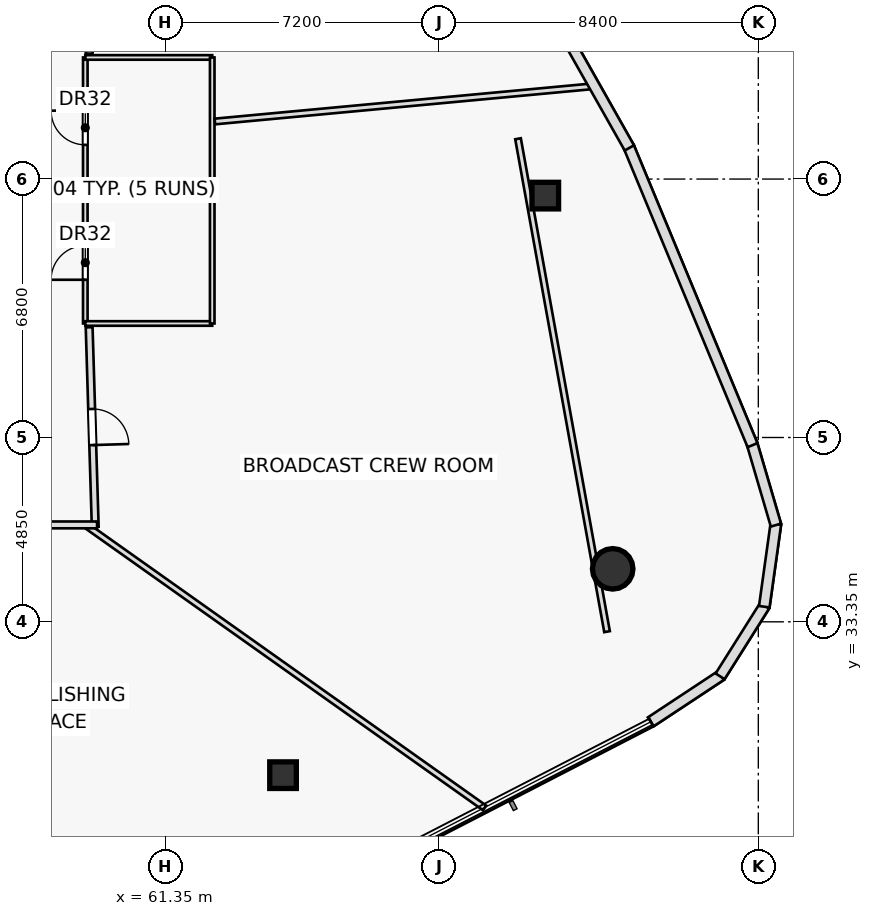
"""IFC4 building model, lengths in metres.
Left out: names, types, materials, properties, quantities, classifications, styles, units other than length and angle.
Written with IfcOpenShell. Run it as: python <this file> out.ifc"""

import sys

from ifc_helpers import new_model, si_unit, direction, frame, frame_2d, origin, origin_2d, place, context, subcontext, project, spatial, rectangle, hollow_rectangle, hollow_circle, extrude, element, fill, save


model = new_model("IFC4")
c1 = context("Model", 3, precision=1e-05, world=origin(), true_north=direction((0.0, 1.0)))
c2 = subcontext(c1, "Body", "Model", "MODEL_VIEW")
j1 = project(units=[si_unit("LENGTHUNIT", "METRE"), si_unit("PLANEANGLEUNIT", "RADIAN")], contexts=[c1])
p1 = place(None, origin())
s1 = spatial("IfcSite", under=j1, at=p1, CompositionType="ELEMENT")
p2 = place(p1, origin())
s2 = spatial("IfcBuilding", under=s1, at=p2, CompositionType="ELEMENT")
p3 = place(p2, frame((0.0, 0.0, 66.6)))
s3 = spatial("IfcBuildingStorey", under=s2, at=p3, CompositionType="ELEMENT", Elevation=66.6)
p4 = place(p3, frame((64.444, 29.315, 0.0), z_axis=(0.0, 0.0, 1.0), x_axis=(1.0, 0.0, 0.0)))
e1 = element("IfcColumn", 1, at=p4, inside=s3, PredefinedType="COLUMN", context=c2, shape_type="SweptSolid", body=[
    extrude(hollow_rectangle(XDim=0.7, YDim=0.7, WallThickness=0.04, at=origin_2d()), origin(), (0.0, 0.0, 1.0), 3.6),
])
p5 = place(p3, frame((73.118, 34.744, 0.0), z_axis=(0.0, 0.0, 1.0), x_axis=(1.0, 0.0, 0.0)))
e2 = element("IfcColumn", 2, at=p5, inside=s3, PredefinedType="COLUMN", context=c2, shape_type="SweptSolid", body=[
    extrude(hollow_circle(Radius=0.533, WallThickness=0.045, at=origin_2d()), origin(), (0.0, 0.0, 1.0), 3.6),
])
p6 = place(p3, frame((71.344, 44.565, 0.0), z_axis=(0.0, 0.0, 1.0), x_axis=(1.0, 0.0, 0.0)))
e3 = element("IfcColumn", 3, at=p6, inside=s3, PredefinedType="COLUMN", context=c2, shape_type="SweptSolid", body=[
    extrude(hollow_rectangle(XDim=0.7, YDim=0.7, WallThickness=0.04, at=origin_2d()), origin(), (0.0, 0.0, 1.0), 3.6),
])
p7 = place(p3, frame((72.969, 33.091, 0.0), z_axis=(0.0, 0.0, 1.0), x_axis=(-0.177742578179, 0.984077017261, 0.0)))
e4 = element("IfcWall", 4, at=p7, inside=s3, PredefinedType="PARTITIONING", context=c2, shape_type="SweptSolid", body=[
    extrude(rectangle(XDim=13.179, YDim=0.15, at=frame_2d((6.59, 0.0))), origin(), (0.0, 0.0, 1.0), 2.975),
])
p8 = place(p3, frame((59.24, 41.2, 0.0), z_axis=(0.0, 0.0, 1.0), x_axis=(0.0, 1.0, 0.0)))
e5 = element("IfcWall", 5, at=p8, inside=s3, PredefinedType="PARTITIONING", context=c2, shape_type="SweptSolid", body=[
    extrude(rectangle(XDim=7.0, YDim=0.12, at=frame_2d((3.5, 0.0))), origin(), (0.0, 0.0, 1.0), 3.6),
])
p9 = place(p8, frame((1.15, 0.0, 0.0)))
e6 = element("IfcOpeningElement", 6, at=p9, cuts=e5, PredefinedType="OPENING", context=c2, shape_type="SweptSolid", body=[
    extrude(rectangle(XDim=0.9, YDim=2.05, at=frame_2d((0.45, 1.025))), frame((0.0, 0.07, 0.0), z_axis=(0.0, -1.0, 0.0), x_axis=(1.0, 0.0, 0.0)), (0.0, 0.0, 1.0), 0.14),
])
p10 = place(p8, frame((4.7, 0.0, 0.0)))
e7 = element("IfcOpeningElement", 7, at=p10, cuts=e5, PredefinedType="OPENING", context=c2, shape_type="SweptSolid", body=[
    extrude(rectangle(XDim=0.9, YDim=2.05, at=frame_2d((0.45, 1.025))), frame((0.0, 0.07, 0.0), z_axis=(0.0, -1.0, 0.0), x_axis=(1.0, 0.0, 0.0)), (0.0, 0.0, 1.0), 0.14),
])
p11 = place(p3, frame((59.24, 41.2, 0.0), z_axis=(0.0, 0.0, 1.0), x_axis=(1.0, 0.0, 0.0)))
e8 = element("IfcWall", 8, at=p11, inside=s3, PredefinedType="PARTITIONING", context=c2, shape_type="SweptSolid", body=[
    extrude(rectangle(XDim=3.34, YDim=0.12, at=frame_2d((1.67, 0.0))), origin(), (0.0, 0.0, 1.0), 2.975),
])
for number, where, z_axis, x_axis in (
    (9, (59.24, 44.65, 0.0), (0.0, 0.0, 1.0), (1.0, 0.0, 0.0)),
    (10, (59.24, 48.2, 0.0), (0.0, 0.0, 1.0), (1.0, 0.0, 0.0)),
):
    element("IfcWall", number, at=place(p3, frame(where, z_axis=z_axis, x_axis=x_axis)), inside=s3, PredefinedType="PARTITIONING", context=c2, shape_type="SweptSolid", body=[
        extrude(rectangle(XDim=3.34, YDim=0.12, at=frame_2d((1.67, 0.0))), origin(), (0.0, 0.0, 1.0), 3.6),
    ])
p12 = place(p3, frame((62.58, 41.2, 0.0), z_axis=(0.0, 0.0, 1.0), x_axis=(0.0, 1.0, 0.0)))
e11 = element("IfcWall", 11, at=p12, inside=s3, PredefinedType="PARTITIONING", context=c2, shape_type="SweptSolid", body=[
    extrude(rectangle(XDim=7.0, YDim=0.12, at=frame_2d((3.5, 0.0))), origin(), (0.0, 0.0, 1.0), 3.6),
])
p13 = place(p3, frame((59.24, 35.9, 0.0), z_axis=(0.0, 0.0, 1.0), x_axis=(0.815881019965, -0.578219820883, 0.0)))
e12 = element("IfcWall", 12, at=p13, inside=s3, PredefinedType="PARTITIONING", context=c2, shape_type="SweptSolid", body=[
    extrude(rectangle(XDim=12.879, YDim=0.15, at=frame_2d((6.439, 0.0))), origin(), (0.0, 0.0, 1.0), 2.975),
])
p14 = place(p3, frame((62.65, 46.515, 0.0), z_axis=(0.0, 0.0, 1.0), x_axis=(0.995684565506, 0.092802187545, 0.0)))
e13 = element("IfcWall", 13, at=p14, inside=s3, PredefinedType="PARTITIONING", context=c2, shape_type="SweptSolid", body=[
    extrude(rectangle(XDim=10.042, YDim=0.15, at=frame_2d((5.021, 0.0))), origin(), (0.0, 0.0, 1.0), 3.025),
])
p15 = place(p3, frame((59.501, 54.15, 0.0), z_axis=(0.0, 0.0, 1.0), x_axis=(-0.027367567602, -0.999625437973, 0.0)))
e14 = element("IfcWall", 14, at=p15, inside=s3, PredefinedType="PARTITIONING", context=c2, shape_type="SweptSolid", body=[
    extrude(rectangle(XDim=5.852, YDim=0.18, at=frame_2d((2.926, 0.0))), origin(), (0.0, 0.0, 1.0), 2.975),
])
p16 = place(p15, frame((2.451, 0.0, 0.0)))
e15 = element("IfcOpeningElement", 15, at=p16, cuts=e14, PredefinedType="OPENING", context=c2, shape_type="SweptSolid", body=[
    extrude(rectangle(XDim=0.95, YDim=2.05, at=frame_2d((0.475, 1.025))), frame((0.0, 0.1, 0.0), z_axis=(0.0, -1.0, 0.0), x_axis=(1.0, 0.0, 0.0)), (0.0, 0.0, 1.0), 0.2),
])
p17 = place(p3, frame((59.342, 41.1, 0.0), z_axis=(0.0, 0.0, 1.0), x_axis=(0.030445329425, -0.999536433511, 0.0)))
e16 = element("IfcWall", 16, at=p17, inside=s3, PredefinedType="PARTITIONING", context=c2, shape_type="SweptSolid", body=[
    extrude(rectangle(XDim=5.252, YDim=0.18, at=frame_2d((2.626, 0.0))), origin(), (0.0, 0.0, 1.0), 2.975),
])
p18 = place(p17, frame((2.151, 0.0, 0.0)))
e17 = element("IfcOpeningElement", 17, at=p18, cuts=e16, PredefinedType="OPENING", context=c2, shape_type="SweptSolid", body=[
    extrude(rectangle(XDim=0.95, YDim=2.05, at=frame_2d((0.475, 1.025))), frame((0.0, 0.1, 0.0), z_axis=(0.0, -1.0, 0.0), x_axis=(1.0, 0.0, 0.0)), (0.0, 0.0, 1.0), 0.2),
])
p19 = place(p3, frame((59.55, 35.9, 0.0), z_axis=(0.0, 0.0, 1.0), x_axis=(-1.0, 0.0, 0.0)))
e18 = element("IfcWall", 18, at=p19, inside=s3, PredefinedType="PARTITIONING", context=c2, shape_type="SweptSolid", body=[
    extrude(rectangle(XDim=22.05, YDim=0.18, at=frame_2d((11.025, 0.0))), origin(), (0.0, 0.0, 1.0), 2.975),
])
p20 = place(p19, frame((5.11, 0.0, 0.0)))
e19 = element("IfcOpeningElement", 19, at=p20, cuts=e18, PredefinedType="OPENING", context=c2, shape_type="SweptSolid", body=[
    extrude(rectangle(XDim=0.95, YDim=2.05, at=frame_2d((0.475, 1.025))), frame((0.0, 0.1, 0.0), z_axis=(0.0, -1.0, 0.0), x_axis=(1.0, 0.0, 0.0)), (0.0, 0.0, 1.0), 0.2),
])
p21 = place(p19, frame((15.55, 0.0, 0.0)))
e20 = element("IfcOpeningElement", 20, at=p21, cuts=e18, PredefinedType="OPENING", context=c2, shape_type="SweptSolid", body=[
    extrude(rectangle(XDim=0.95, YDim=2.05, at=frame_2d((0.475, 1.025))), frame((0.0, 0.1, 0.0), z_axis=(0.0, -1.0, 0.0), x_axis=(1.0, 0.0, 0.0)), (0.0, 0.0, 1.0), 0.2),
])
p22 = place(p3, frame((74.121, 30.719, 0.0), z_axis=(0.0, 0.0, 1.0), x_axis=(0.834320802666, 0.55127923799, 0.0)))
e21 = element("IfcWall", 21, at=p22, inside=s3, PredefinedType="STANDARD", context=c2, shape_type="SweptSolid", body=[
    extrude(rectangle(XDim=2.21, YDim=0.28, at=frame_2d((1.105, 0.0))), origin(), (0.0, 0.0, 1.0), 3.6),
])
p23 = place(p3, frame((75.944, 31.916, 0.0), z_axis=(0.0, 0.0, 1.0), x_axis=(0.533637775871, 0.845713145318, 0.0)))
e22 = element("IfcWall", 22, at=p23, inside=s3, PredefinedType="STANDARD", context=c2, shape_type="SweptSolid", body=[
    extrude(rectangle(XDim=2.198, YDim=0.28, at=frame_2d((1.099, 0.0))), origin(), (0.0, 0.0, 1.0), 3.6),
])
p24 = place(p3, frame((77.107, 33.747, 0.0), z_axis=(0.0, 0.0, 1.0), x_axis=(0.13837336271, 0.990380135348, 0.0)))
e23 = element("IfcWall", 23, at=p24, inside=s3, PredefinedType="STANDARD", context=c2, shape_type="SweptSolid", body=[
    extrude(rectangle(XDim=2.198, YDim=0.28, at=frame_2d((1.099, 0.0))), origin(), (0.0, 0.0, 1.0), 3.6),
])
p25 = place(p3, frame((77.413, 35.895, 0.0), z_axis=(0.0, 0.0, 1.0), x_axis=(-0.281553200158, 0.959545619281, 0.0)))
e24 = element("IfcWall", 24, at=p25, inside=s3, PredefinedType="STANDARD", context=c2, shape_type="SweptSolid", body=[
    extrude(rectangle(XDim=2.221, YDim=0.28, at=frame_2d((1.11, 0.0))), origin(), (0.0, 0.0, 1.0), 3.6),
])
p26 = place(p3, frame((76.798, 37.998, 0.0), z_axis=(0.0, 0.0, 1.0), x_axis=(-0.383058080103, 0.923724259326, 0.0)))
e25 = element("IfcWall", 25, at=p26, inside=s3, PredefinedType="STANDARD", context=c2, shape_type="SweptSolid", body=[
    extrude(rectangle(XDim=8.497, YDim=0.28, at=frame_2d((4.248, 0.0))), origin(), (0.0, 0.0, 1.0), 3.6),
])
p27 = place(p3, frame((73.556, 45.82, 0.0), z_axis=(0.0, 0.0, 1.0), x_axis=(-0.492021225842, 0.870583202986, 0.0)))
e26 = element("IfcWall", 26, at=p27, inside=s3, PredefinedType="STANDARD", context=c2, shape_type="SweptSolid", body=[
    extrude(rectangle(XDim=8.485, YDim=0.28, at=frame_2d((4.242, 0.0))), origin(), (0.0, 0.0, 1.0), 3.6),
])
p28 = place(p9, origin())
e27 = element("IfcDoor", 27, at=p28, inside=s3, OperationType="SINGLE_SWING_LEFT", PredefinedType="DOOR", context=c2, shape_type="SweptSolid", body=[
    extrude(rectangle(XDim=0.9, YDim=2.05, at=frame_2d((0.45, 1.025))), frame((0.0, 0.025, 0.0), z_axis=(0.0, -1.0, 0.0), x_axis=(1.0, 0.0, 0.0)), (0.0, 0.0, 1.0), 0.05),
])
fill(e6, e27)
p29 = place(p10, origin())
e28 = element("IfcDoor", 28, at=p29, inside=s3, OperationType="SINGLE_SWING_RIGHT", PredefinedType="DOOR", context=c2, shape_type="SweptSolid", body=[
    extrude(rectangle(XDim=0.9, YDim=2.05, at=frame_2d((0.45, 1.025))), frame((0.0, 0.025, 0.0), z_axis=(0.0, -1.0, 0.0), x_axis=(1.0, 0.0, 0.0)), (0.0, 0.0, 1.0), 0.05),
])
fill(e7, e28)
p30 = place(p18, origin())
e29 = element("IfcDoor", 29, at=p30, inside=s3, OperationType="SINGLE_SWING_RIGHT", PredefinedType="DOOR", context=c2, shape_type="SweptSolid", body=[
    extrude(rectangle(XDim=0.95, YDim=2.05, at=frame_2d((0.475, 1.025))), frame((0.0, 0.025, 0.0), z_axis=(0.0, -1.0, 0.0), x_axis=(1.0, 0.0, 0.0)), (0.0, 0.0, 1.0), 0.05),
])
fill(e17, e29)
save(model, sys.argv[1])
